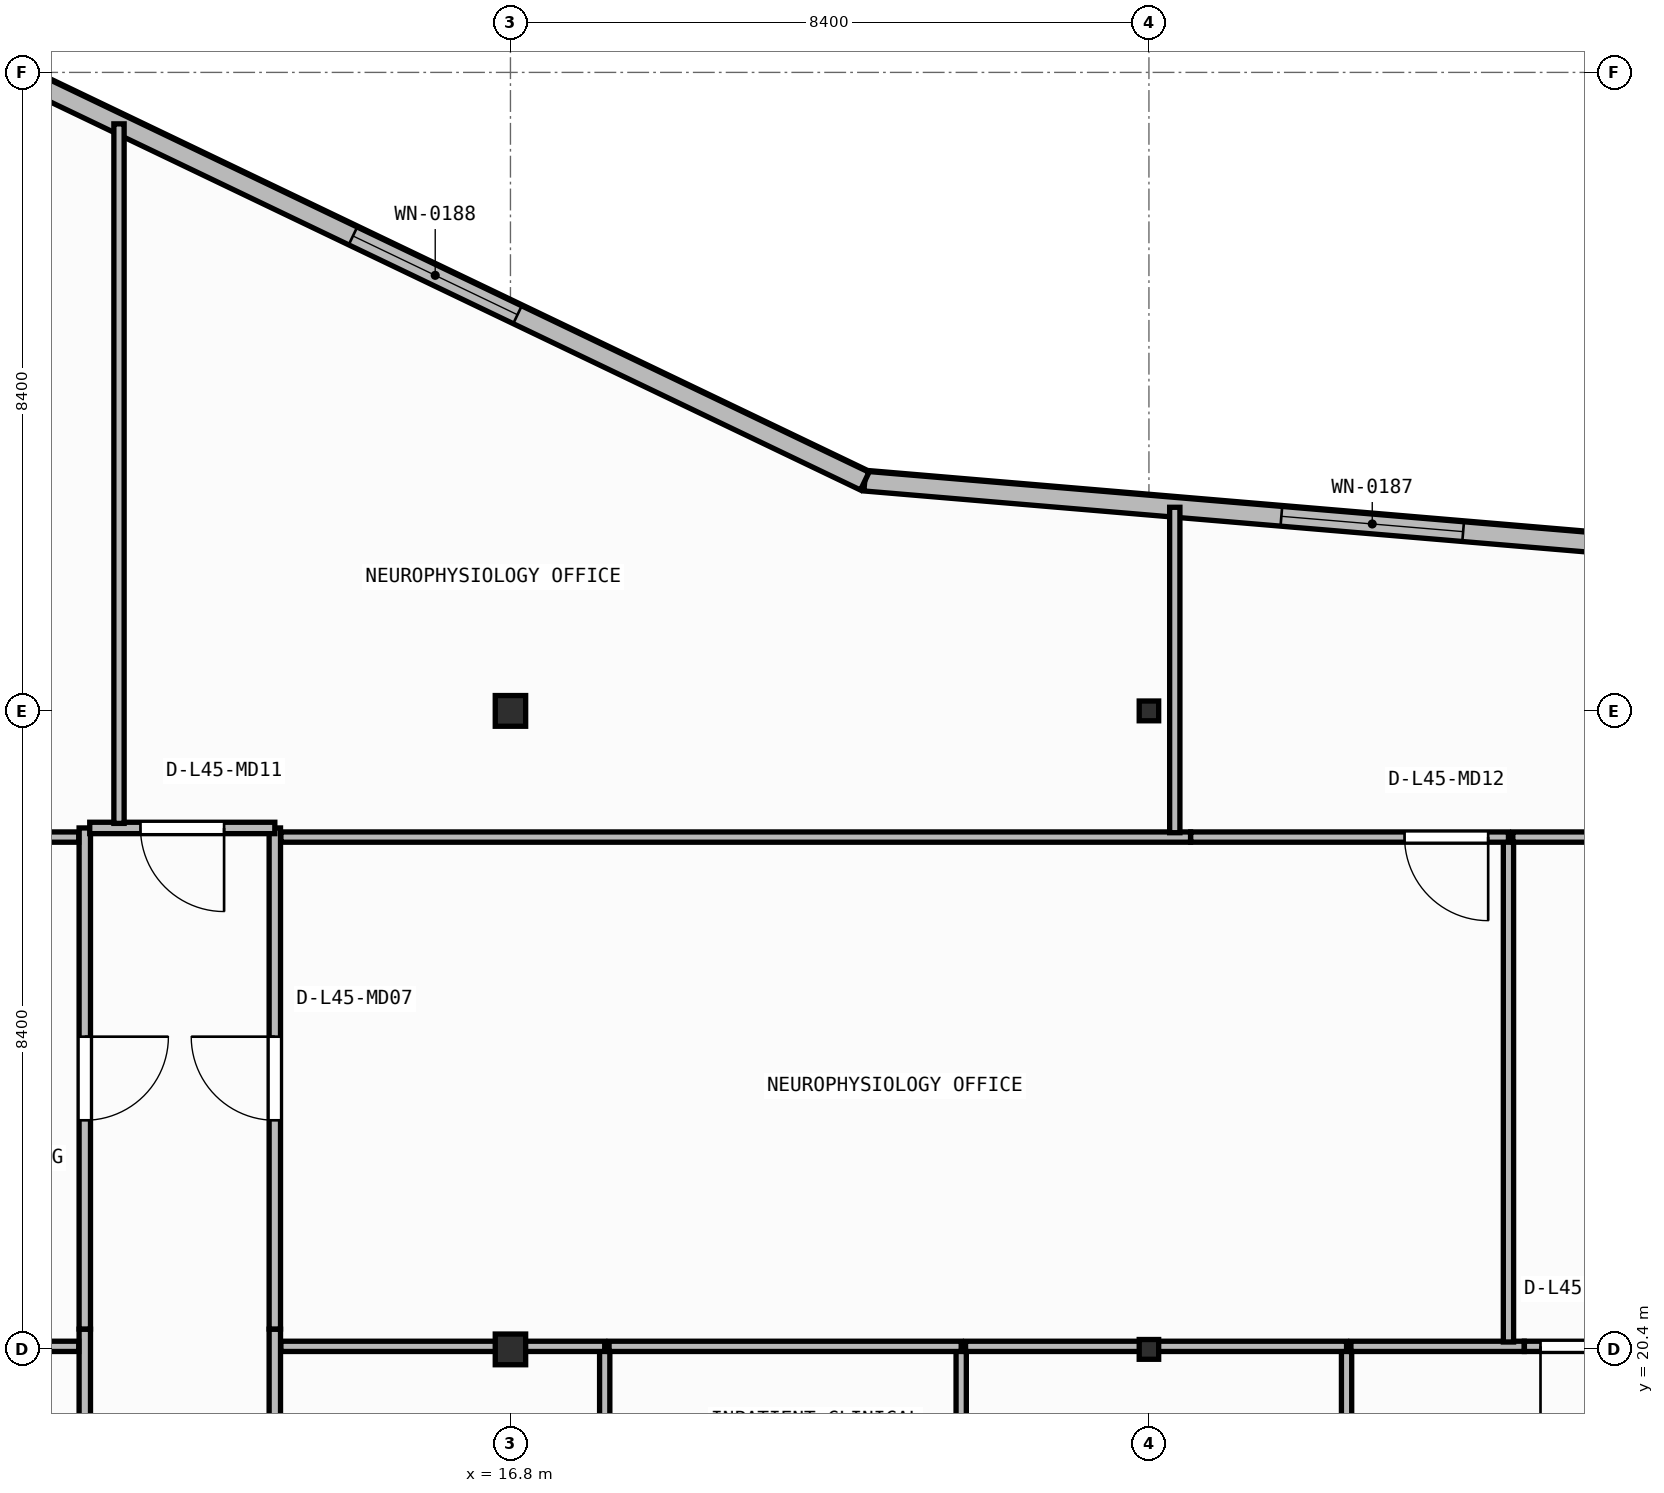
"""IFC4 building model, lengths in metres.
Left out: names, types, materials, properties, quantities, classifications, styles, units other than length and angle.
Written with IfcOpenShell. Run it as: python <this file> out.ifc"""

import sys

from ifc_helpers import new_model, si_unit, direction, frame, frame_2d, origin, origin_2d, place, context, subcontext, project, spatial, rectangle, i_section, extrude, element, fill, save


model = new_model("IFC4")
c1 = context("Model", 3, precision=1e-05, world=origin(), true_north=direction((0.0, 1.0)))
c2 = subcontext(c1, "Body", "Model", "MODEL_VIEW")
j1 = project(units=[si_unit("LENGTHUNIT", "METRE"), si_unit("PLANEANGLEUNIT", "RADIAN")], contexts=[c1])
p1 = place(None, origin())
s1 = spatial("IfcSite", under=j1, at=p1, CompositionType="ELEMENT")
p2 = place(p1, origin())
s2 = spatial("IfcBuilding", under=s1, at=p2, CompositionType="ELEMENT")
p3 = place(p2, frame((0.0, 0.0, 184.2)))
s3 = spatial("IfcBuildingStorey", under=s2, at=p3, CompositionType="ELEMENT", Elevation=184.2)
p4 = place(p3, frame((16.8, 20.4, 0.0), z_axis=(0.0, 0.0, 1.0), x_axis=(1.0, 0.0, 0.0)))
e1 = element("IfcColumn", 1, at=p4, inside=s3, PredefinedType="COLUMN", context=c2, shape_type="SweptSolid", body=[
    extrude(i_section(OverallWidth=0.4, OverallDepth=0.404, WebThickness=0.02, FlangeThickness=0.032, at=origin_2d()), origin(), (0.0, 0.0, 1.0), 3.95),
])
p5 = place(p3, frame((25.2, 20.4, 0.0), z_axis=(0.0, 0.0, 1.0), x_axis=(1.0, 0.0, 0.0)))
e2 = element("IfcColumn", 2, at=p5, inside=s3, PredefinedType="COLUMN", context=c2, shape_type="SweptSolid", body=[
    extrude(i_section(OverallWidth=0.256, OverallDepth=0.26, WebThickness=0.01, FlangeThickness=0.017, FilletRadius=0.013, at=origin_2d()), origin(), (0.0, 0.0, 1.0), 3.95),
])
p6 = place(p3, frame((16.8, 28.8, 0.0), z_axis=(0.0, 0.0, 1.0), x_axis=(1.0, 0.0, 0.0)))
e3 = element("IfcColumn", 3, at=p6, inside=s3, PredefinedType="COLUMN", context=c2, shape_type="SweptSolid", body=[
    extrude(i_section(OverallWidth=0.4, OverallDepth=0.404, WebThickness=0.02, FlangeThickness=0.032, at=origin_2d()), origin(), (0.0, 0.0, 1.0), 3.95),
])
p7 = place(p3, frame((25.2, 28.8, 0.0), z_axis=(0.0, 0.0, 1.0), x_axis=(1.0, 0.0, 0.0)))
e4 = element("IfcColumn", 4, at=p7, inside=s3, PredefinedType="COLUMN", context=c2, shape_type="SweptSolid", body=[
    extrude(i_section(OverallWidth=0.256, OverallDepth=0.26, WebThickness=0.01, FlangeThickness=0.017, FilletRadius=0.013, at=origin_2d()), origin(), (0.0, 0.0, 1.0), 3.95),
])
p8 = place(p3, frame((34.815, 30.696, 0.0), z_axis=(0.0, 0.0, 1.0), x_axis=(-0.996454704935, 0.084130975344, 0.0)))
e5 = element("IfcWall", 5, at=p8, inside=s3, PredefinedType="STANDARD", context=c2, shape_type="SweptSolid", body=[
    extrude(rectangle(XDim=13.401, YDim=0.26, at=frame_2d((6.701, 0.0))), origin(), (0.0, 0.0, 1.0), 3.71),
])
p9 = place(p8, frame((5.5, 0.0, 0.9)))
e6 = element("IfcOpeningElement", 6, at=p9, cuts=e5, PredefinedType="OPENING", context=c2, shape_type="SweptSolid", body=[
    extrude(rectangle(XDim=2.4, YDim=1.65, at=frame_2d((1.2, 0.825))), frame((0.0, 0.14, 0.0), z_axis=(0.0, -1.0, 0.0), x_axis=(1.0, 0.0, 0.0)), (0.0, 0.0, 1.0), 0.28),
])
p10 = place(p3, frame((21.461, 31.823, 0.0), z_axis=(0.0, 0.0, 1.0), x_axis=(-0.901858094827, 0.432032379336, 0.0)))
e7 = element("IfcWall", 7, at=p10, inside=s3, PredefinedType="STANDARD", context=c2, shape_type="SweptSolid", body=[
    extrude(rectangle(XDim=12.532, YDim=0.26, at=frame_2d((6.266, 0.0))), origin(), (0.0, 0.0, 1.0), 3.71),
])
p11 = place(p10, frame((5.066, 0.0, 0.9)))
e8 = element("IfcOpeningElement", 8, at=p11, cuts=e7, PredefinedType="OPENING", context=c2, shape_type="SweptSolid", body=[
    extrude(rectangle(XDim=2.4, YDim=1.65, at=frame_2d((1.2, 0.825))), frame((0.0, 0.14, 0.0), z_axis=(0.0, -1.0, 0.0), x_axis=(1.0, 0.0, 0.0)), (0.0, 0.0, 1.0), 0.28),
])
for number, where, z_axis, x_axis in (
    (9, (11.2, 20.666, 0.0), (0.0, 0.0, 1.0), (0.0, -1.0, 0.0)),
    (10, (13.7, 14.7, 0.0), (0.0, 0.0, 1.0), (0.0, 1.0, 0.0)),
):
    element("IfcWall", number, at=place(p3, frame(where, z_axis=z_axis, x_axis=x_axis)), inside=s3, PredefinedType="PARTITIONING", context=c2, shape_type="SweptSolid", body=[
        extrude(rectangle(XDim=5.966, YDim=0.15, at=frame_2d((2.983, 0.0))), origin(), (0.0, 0.0, 1.0), 3.71),
    ])
p12 = place(p3, frame((11.2, 27.26, 0.0), z_axis=(0.0, 0.0, 1.0), x_axis=(0.0, -1.0, 0.0)))
e11 = element("IfcWall", 11, at=p12, inside=s3, PredefinedType="PARTITIONING", context=c2, shape_type="SweptSolid", body=[
    extrude(rectangle(XDim=6.592, YDim=0.15, at=frame_2d((3.296, 0.0))), origin(), (0.0, 0.0, 1.0), 3.71),
])
p13 = place(p12, frame((2.746, 0.0, 0.0)))
e12 = element("IfcOpeningElement", 12, at=p13, cuts=e11, PredefinedType="OPENING", context=c2, shape_type="SweptSolid", body=[
    extrude(rectangle(XDim=1.1, YDim=2.1, at=frame_2d((0.55, 1.05))), frame((0.0, 0.085, 0.0), z_axis=(0.0, -1.0, 0.0), x_axis=(1.0, 0.0, 0.0)), (0.0, 0.0, 1.0), 0.17),
])
p14 = place(p3, frame((13.7, 20.668, 0.0), z_axis=(0.0, 0.0, 1.0), x_axis=(0.0, 1.0, 0.0)))
e13 = element("IfcWall", 13, at=p14, inside=s3, PredefinedType="PARTITIONING", context=c2, shape_type="SweptSolid", body=[
    extrude(rectangle(XDim=6.592, YDim=0.15, at=frame_2d((3.296, 0.0))), origin(), (0.0, 0.0, 1.0), 3.71),
])
p15 = place(p14, frame((2.746, 0.0, 0.0)))
e14 = element("IfcOpeningElement", 14, at=p15, cuts=e13, PredefinedType="OPENING", context=c2, shape_type="SweptSolid", body=[
    extrude(rectangle(XDim=1.1, YDim=2.1, at=frame_2d((0.55, 1.05))), frame((0.0, 0.085, 0.0), z_axis=(0.0, -1.0, 0.0), x_axis=(1.0, 0.0, 0.0)), (0.0, 0.0, 1.0), 0.17),
])
p16 = place(p3, frame((13.7, 27.26, 0.0), z_axis=(0.0, 0.0, 1.0), x_axis=(-1.0, 0.0, 0.0)))
e15 = element("IfcWall", 15, at=p16, inside=s3, PredefinedType="PARTITIONING", context=c2, shape_type="SweptSolid", body=[
    extrude(rectangle(XDim=2.435, YDim=0.15, at=frame_2d((1.218, 0.0))), origin(), (0.0, 0.0, 1.0), 3.71),
])
p17 = place(p16, frame((0.667, 0.0, 0.0)))
e16 = element("IfcOpeningElement", 16, at=p17, cuts=e15, PredefinedType="OPENING", context=c2, shape_type="SweptSolid", body=[
    extrude(rectangle(XDim=1.1, YDim=2.1, at=frame_2d((0.55, 1.05))), frame((0.0, 0.085, 0.0), z_axis=(0.0, -1.0, 0.0), x_axis=(1.0, 0.0, 0.0)), (0.0, 0.0, 1.0), 0.17),
])
p18 = place(p3, frame((11.12, 20.44, 0.0), z_axis=(0.0, 0.0, 1.0), x_axis=(-1.0, 0.0, 0.0)))
e17 = element("IfcWall", 17, at=p18, inside=s3, PredefinedType="PARTITIONING", context=c2, shape_type="SweptSolid", body=[
    extrude(rectangle(XDim=5.653, YDim=0.135, at=frame_2d((2.826, 0.0))), origin(), (0.0, 0.0, 1.0), 3.152),
])
p19 = place(p3, frame((18.04, 17.833, 0.0), z_axis=(0.0, 0.0, 1.0), x_axis=(0.0, 1.0, 0.0)))
e18 = element("IfcWall", 18, at=p19, inside=s3, PredefinedType="PARTITIONING", context=c2, shape_type="SweptSolid", body=[
    extrude(rectangle(XDim=2.607, YDim=0.135, at=frame_2d((1.304, 0.0))), origin(), (0.0, 0.0, 1.0), 3.71),
])
p20 = place(p3, frame((18.04, 20.44, 0.0), z_axis=(0.0, 0.0, 1.0), x_axis=(-1.0, 0.0, 0.0)))
e19 = element("IfcWall", 19, at=p20, inside=s3, PredefinedType="PARTITIONING", context=c2, shape_type="SweptSolid", body=[
    extrude(rectangle(XDim=4.26, YDim=0.135, at=frame_2d((2.13, 0.0))), origin(), (0.0, 0.0, 1.0), 3.152),
])
p21 = place(p3, frame((22.73, 14.76, 0.0), z_axis=(0.0, 0.0, 1.0), x_axis=(0.0, 1.0, 0.0)))
e20 = element("IfcWall", 20, at=p21, inside=s3, PredefinedType="PARTITIONING", context=c2, shape_type="SweptSolid", body=[
    extrude(rectangle(XDim=5.68, YDim=0.135, at=frame_2d((2.84, 0.0))), origin(), (0.0, 0.0, 1.0), 3.71),
])
p22 = place(p3, frame((22.73, 20.44, 0.0), z_axis=(0.0, 0.0, 1.0), x_axis=(-1.0, 0.0, 0.0)))
e21 = element("IfcWall", 21, at=p22, inside=s3, PredefinedType="PARTITIONING", context=c2, shape_type="SweptSolid", body=[
    extrude(rectangle(XDim=4.633, YDim=0.135, at=frame_2d((2.316, 0.0))), origin(), (0.0, 0.0, 1.0), 3.152),
])
p23 = place(p3, frame((27.8, 17.833, 0.0), z_axis=(0.0, 0.0, 1.0), x_axis=(0.0, 1.0, 0.0)))
e22 = element("IfcWall", 22, at=p23, inside=s3, PredefinedType="PARTITIONING", context=c2, shape_type="SweptSolid", body=[
    extrude(rectangle(XDim=2.607, YDim=0.135, at=frame_2d((1.304, 0.0))), origin(), (0.0, 0.0, 1.0), 3.71),
])
p24 = place(p3, frame((27.8, 20.44, 0.0), z_axis=(0.0, 0.0, 1.0), x_axis=(-1.0, 0.0, 0.0)))
e23 = element("IfcWall", 23, at=p24, inside=s3, PredefinedType="PARTITIONING", context=c2, shape_type="SweptSolid", body=[
    extrude(rectangle(XDim=5.012, YDim=0.135, at=frame_2d((2.506, 0.0))), origin(), (0.0, 0.0, 1.0), 3.152),
])
p25 = place(p3, frame((30.137, 20.44, 0.0), z_axis=(0.0, 0.0, 1.0), x_axis=(-1.0, 0.0, 0.0)))
e24 = element("IfcWall", 24, at=p25, inside=s3, PredefinedType="PARTITIONING", context=c2, shape_type="SweptSolid", body=[
    extrude(rectangle(XDim=2.28, YDim=0.135, at=frame_2d((1.14, 0.0))), origin(), (0.0, 0.0, 1.0), 3.152),
])
p26 = place(p3, frame((32.12, 20.44, 0.0), z_axis=(0.0, 0.0, 1.0), x_axis=(-1.0, 0.0, 0.0)))
e25 = element("IfcWall", 25, at=p26, inside=s3, PredefinedType="PARTITIONING", context=c2, shape_type="SweptSolid", body=[
    extrude(rectangle(XDim=1.981, YDim=0.135, at=frame_2d((0.99, 0.0))), origin(), (0.0, 0.0, 1.0), 3.152),
])
p27 = place(p26, frame((0.668, 0.0, 0.0)))
e26 = element("IfcOpeningElement", 26, at=p27, cuts=e25, PredefinedType="OPENING", context=c2, shape_type="SweptSolid", body=[
    extrude(rectangle(XDim=1.1, YDim=2.1, at=frame_2d((0.55, 1.05))), frame((0.0, 0.077, 0.0), z_axis=(0.0, -1.0, 0.0), x_axis=(1.0, 0.0, 0.0)), (0.0, 0.0, 1.0), 0.155),
])
p28 = place(p3, frame((11.12, 27.14, 0.0), z_axis=(0.0, 0.0, 1.0), x_axis=(-1.0, 0.0, 0.0)))
e27 = element("IfcWall", 27, at=p28, inside=s3, PredefinedType="PARTITIONING", context=c2, shape_type="SweptSolid", body=[
    extrude(rectangle(XDim=10.88, YDim=0.135, at=frame_2d((5.44, 0.0))), origin(), (0.0, 0.0, 1.0), 3.71),
])
p29 = place(p28, frame((5.828, 0.0, 0.0)))
e28 = element("IfcOpeningElement", 28, at=p29, cuts=e27, PredefinedType="OPENING", context=c2, shape_type="SweptSolid", body=[
    extrude(rectangle(XDim=1.1, YDim=2.1, at=frame_2d((0.55, 1.05))), frame((0.0, 0.077, 0.0), z_axis=(0.0, -1.0, 0.0), x_axis=(1.0, 0.0, 0.0)), (0.0, 0.0, 1.0), 0.155),
])
p30 = place(p3, frame((29.93, 20.498, 0.0), z_axis=(0.0, 0.0, 1.0), x_axis=(0.0, 1.0, 0.0)))
e29 = element("IfcWall", 29, at=p30, inside=s3, PredefinedType="PARTITIONING", context=c2, shape_type="SweptSolid", body=[
    extrude(rectangle(XDim=6.642, YDim=0.135, at=frame_2d((3.321, 0.0))), origin(), (0.0, 0.0, 1.0), 3.71),
])
p31 = place(p3, frame((25.748, 27.14, 0.0), z_axis=(0.0, 0.0, 1.0), x_axis=(-1.0, 0.0, 0.0)))
e30 = element("IfcWall", 30, at=p31, inside=s3, PredefinedType="PARTITIONING", context=c2, shape_type="SweptSolid", body=[
    extrude(rectangle(XDim=11.968, YDim=0.135, at=frame_2d((5.984, 0.0))), origin(), (0.0, 0.0, 1.0), 3.71),
])
p32 = place(p3, frame((29.93, 27.14, 0.0), z_axis=(0.0, 0.0, 1.0), x_axis=(-1.0, 0.0, 0.0)))
e31 = element("IfcWall", 31, at=p32, inside=s3, PredefinedType="PARTITIONING", context=c2, shape_type="SweptSolid", body=[
    extrude(rectangle(XDim=4.18, YDim=0.135, at=frame_2d((2.09, 0.0))), origin(), (0.0, 0.0, 1.0), 3.71),
])
p33 = place(p32, frame((0.267, 0.0, 0.0)))
e32 = element("IfcOpeningElement", 32, at=p33, cuts=e31, PredefinedType="OPENING", context=c2, shape_type="SweptSolid", body=[
    extrude(rectangle(XDim=1.1, YDim=2.1, at=frame_2d((0.55, 1.05))), frame((0.0, 0.077, 0.0), z_axis=(0.0, -1.0, 0.0), x_axis=(1.0, 0.0, 0.0)), (0.0, 0.0, 1.0), 0.155),
])
p34 = place(p3, frame((39.07, 27.14, 0.0), z_axis=(0.0, 0.0, 1.0), x_axis=(-1.0, 0.0, 0.0)))
e33 = element("IfcWall", 33, at=p34, inside=s3, PredefinedType="PARTITIONING", context=c2, shape_type="SweptSolid", body=[
    extrude(rectangle(XDim=9.083, YDim=0.135, at=frame_2d((4.541, 0.0))), origin(), (0.0, 0.0, 1.0), 3.71),
])
p35 = place(p3, frame((11.65, 27.32, 0.0), z_axis=(0.0, 0.0, 1.0), x_axis=(0.0, 1.0, 0.0)))
e34 = element("IfcWall", 34, at=p35, inside=s3, PredefinedType="PARTITIONING", context=c2, shape_type="SweptSolid", body=[
    extrude(rectangle(XDim=9.203, YDim=0.135, at=frame_2d((4.602, 0.0))), origin(), (0.0, 0.0, 1.0), 3.71),
])
p36 = place(p3, frame((25.54, 27.198, 0.0), z_axis=(0.0, 0.0, 1.0), x_axis=(0.0, 1.0, 0.0)))
e35 = element("IfcWall", 35, at=p36, inside=s3, PredefinedType="PARTITIONING", context=c2, shape_type="SweptSolid", body=[
    extrude(rectangle(XDim=4.281, YDim=0.135, at=frame_2d((2.141, 0.0))), origin(), (0.0, 0.0, 1.0), 3.152),
])
p37 = place(p9, origin())
e36 = element("IfcWindow", 36, at=p37, inside=s3, PartitioningType="SINGLE_PANEL", PredefinedType="WINDOW", context=c2, shape_type="SweptSolid", body=[
    extrude(rectangle(XDim=2.4, YDim=1.65, at=frame_2d((1.2, 0.825))), frame((0.0, 0.03, 0.0), z_axis=(0.0, -1.0, 0.0), x_axis=(1.0, 0.0, 0.0)), (0.0, 0.0, 1.0), 0.06),
])
fill(e6, e36)
p38 = place(p11, origin())
e37 = element("IfcWindow", 37, at=p38, inside=s3, PartitioningType="SINGLE_PANEL", PredefinedType="WINDOW", context=c2, shape_type="SweptSolid", body=[
    extrude(rectangle(XDim=2.4, YDim=1.65, at=frame_2d((1.2, 0.825))), frame((0.0, 0.03, 0.0), z_axis=(0.0, -1.0, 0.0), x_axis=(1.0, 0.0, 0.0)), (0.0, 0.0, 1.0), 0.06),
])
fill(e8, e37)
p39 = place(p13, origin())
e38 = element("IfcDoor", 38, at=p39, inside=s3, OperationType="SINGLE_SWING_LEFT", PredefinedType="DOOR", context=c2, shape_type="SweptSolid", body=[
    extrude(rectangle(XDim=1.1, YDim=2.1, at=frame_2d((0.55, 1.05))), frame((0.0, 0.025, 0.0), z_axis=(0.0, -1.0, 0.0), x_axis=(1.0, 0.0, 0.0)), (0.0, 0.0, 1.0), 0.05),
])
fill(e12, e38)
p40 = place(p15, origin())
e39 = element("IfcDoor", 39, at=p40, inside=s3, OperationType="SINGLE_SWING_RIGHT", PredefinedType="DOOR", context=c2, shape_type="SweptSolid", body=[
    extrude(rectangle(XDim=1.1, YDim=2.1, at=frame_2d((0.55, 1.05))), frame((0.0, 0.025, 0.0), z_axis=(0.0, -1.0, 0.0), x_axis=(1.0, 0.0, 0.0)), (0.0, 0.0, 1.0), 0.05),
])
fill(e14, e39)
p41 = place(p17, origin())
e40 = element("IfcDoor", 40, at=p41, inside=s3, OperationType="SINGLE_SWING_LEFT", PredefinedType="DOOR", context=c2, shape_type="SweptSolid", body=[
    extrude(rectangle(XDim=1.1, YDim=2.1, at=frame_2d((0.55, 1.05))), frame((0.0, 0.025, 0.0), z_axis=(0.0, -1.0, 0.0), x_axis=(1.0, 0.0, 0.0)), (0.0, 0.0, 1.0), 0.05),
])
fill(e16, e40)
p42 = place(p27, origin())
e41 = element("IfcDoor", 41, at=p42, inside=s3, OperationType="SINGLE_SWING_RIGHT", PredefinedType="DOOR", context=c2, shape_type="SweptSolid", body=[
    extrude(rectangle(XDim=1.1, YDim=2.1, at=frame_2d((0.55, 1.05))), frame((0.0, 0.025, 0.0), z_axis=(0.0, -1.0, 0.0), x_axis=(1.0, 0.0, 0.0)), (0.0, 0.0, 1.0), 0.05),
])
fill(e26, e41)
p43 = place(p33, origin())
e42 = element("IfcDoor", 42, at=p43, inside=s3, OperationType="SINGLE_SWING_LEFT", PredefinedType="DOOR", context=c2, shape_type="SweptSolid", body=[
    extrude(rectangle(XDim=1.1, YDim=2.1, at=frame_2d((0.55, 1.05))), frame((0.0, 0.025, 0.0), z_axis=(0.0, -1.0, 0.0), x_axis=(1.0, 0.0, 0.0)), (0.0, 0.0, 1.0), 0.05),
])
fill(e32, e42)
save(model, sys.argv[1])
